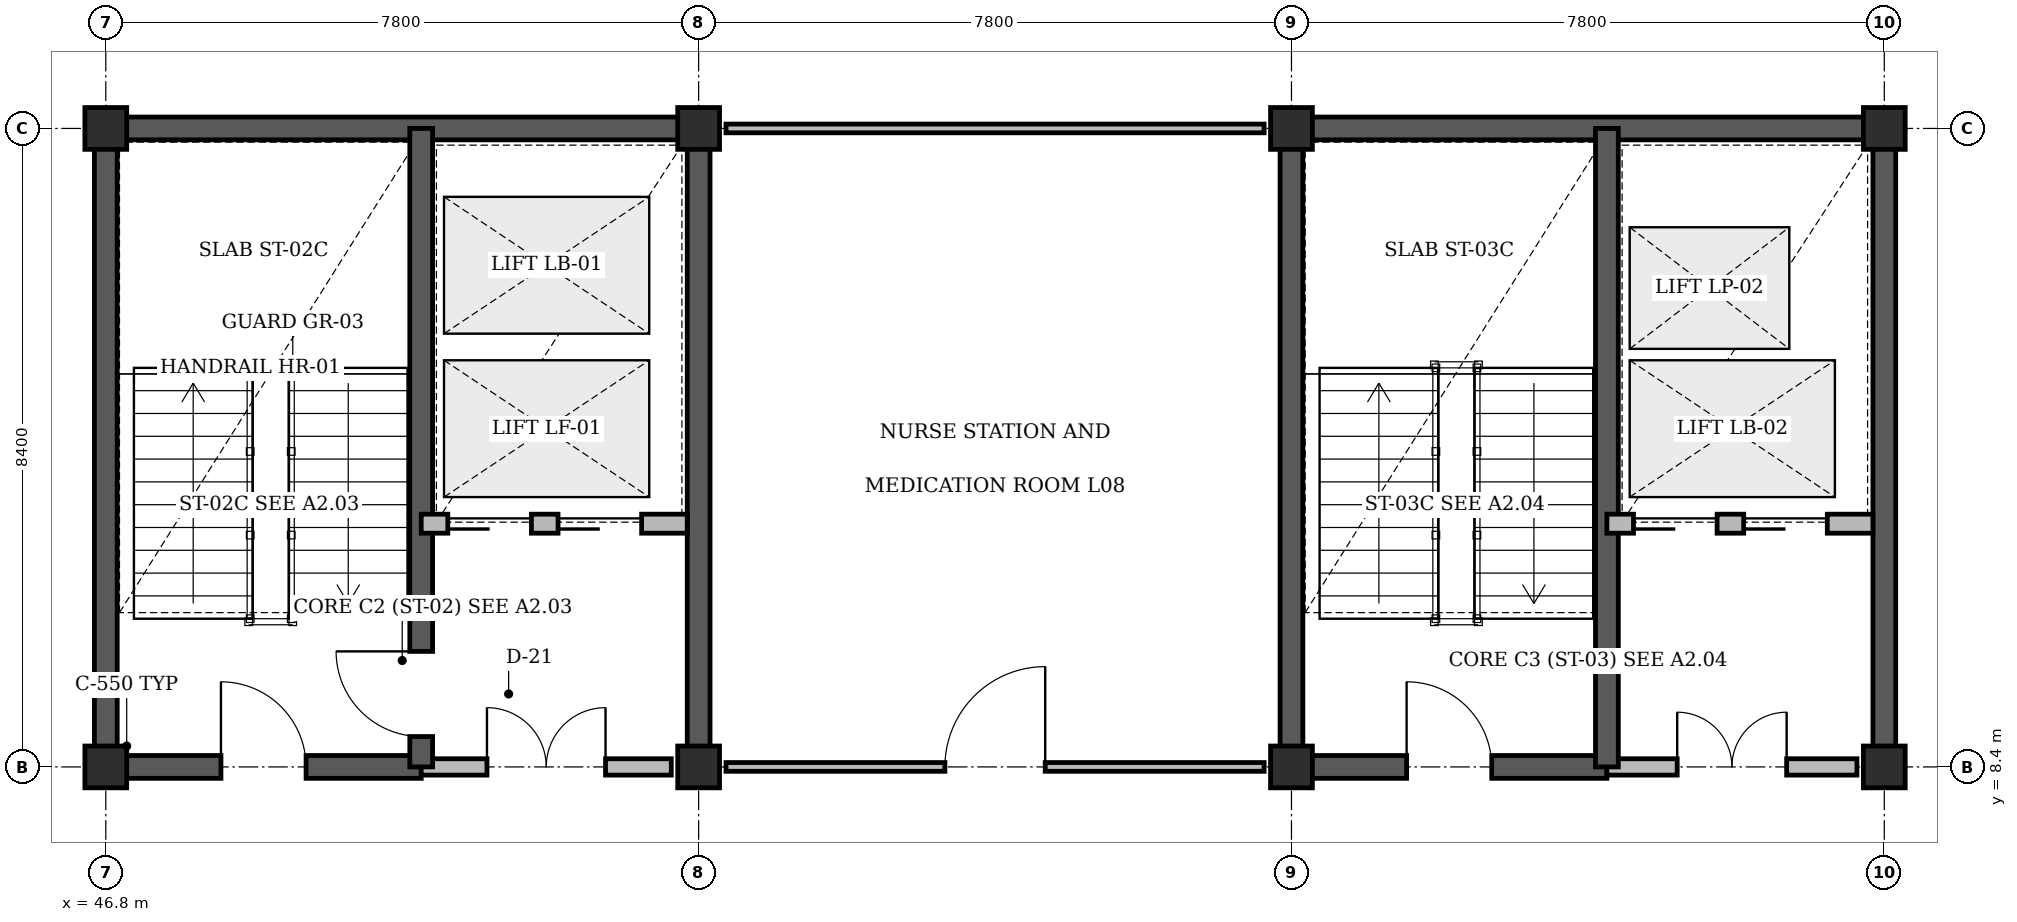
"""IFC4 building model, lengths in metres.
Left out: names, types, materials, properties, quantities, classifications, styles, units other than length and angle.
Written with IfcOpenShell. Run it as: python <this file> out.ifc"""

import sys

from ifc_helpers import new_model, si_unit, direction, frame, frame_2d, origin, origin_2d, place, context, subcontext, project, spatial, rectangle, extrude, element, fill, save


model = new_model("IFC4")
c1 = context("Model", 3, precision=1e-05, world=origin(), true_north=direction((0.0, 1.0)))
c2 = subcontext(c1, "Body", "Model", "MODEL_VIEW")
j1 = project(units=[si_unit("LENGTHUNIT", "METRE"), si_unit("PLANEANGLEUNIT", "RADIAN")], contexts=[c1])
p1 = place(None, origin())
s1 = spatial("IfcSite", under=j1, at=p1, CompositionType="ELEMENT")
p2 = place(p1, origin())
s2 = spatial("IfcBuilding", under=s1, at=p2, CompositionType="ELEMENT")
p3 = place(p2, frame((0.0, 0.0, 34.8)))
s3 = spatial("IfcBuildingStorey", under=s2, at=p3, CompositionType="ELEMENT", Elevation=34.8)
p4 = place(p3, frame((46.65, 16.8, 0.0), z_axis=(0.0, 0.0, 1.0), x_axis=(1.0, 0.0, 0.0)))
e1 = element("IfcWall", 1, at=p4, inside=s3, PredefinedType="SHEAR", context=c2, shape_type="SweptSolid", body=[
    extrude(rectangle(XDim=8.1, YDim=0.3, at=frame_2d((4.05, 0.0))), origin(), (0.0, 0.0, 1.0), 3.92),
])
for number, where, z_axis, x_axis in (
    (2, (46.8, 8.4, 0.0), (0.0, 0.0, 1.0), (0.0, 1.0, 0.0)),
    (3, (54.6, 8.4, 0.0), (0.0, 0.0, 1.0), (0.0, 1.0, 0.0)),
):
    element("IfcWall", number, at=place(p3, frame(where, z_axis=z_axis, x_axis=x_axis)), inside=s3, PredefinedType="SHEAR", context=c2, shape_type="SweptSolid", body=[
        extrude(rectangle(XDim=8.4, YDim=0.3, at=frame_2d((4.2, 0.0))), origin(), (0.0, 0.0, 1.0), 3.92),
    ])
p5 = place(p3, frame((62.25, 16.8, 0.0), z_axis=(0.0, 0.0, 1.0), x_axis=(1.0, 0.0, 0.0)))
e4 = element("IfcWall", 4, at=p5, inside=s3, PredefinedType="SHEAR", context=c2, shape_type="SweptSolid", body=[
    extrude(rectangle(XDim=8.1, YDim=0.3, at=frame_2d((4.05, 0.0))), origin(), (0.0, 0.0, 1.0), 3.92),
])
for number, where, z_axis, x_axis in (
    (5, (62.4, 8.4, 0.0), (0.0, 0.0, 1.0), (0.0, 1.0, 0.0)),
    (6, (70.2, 8.4, 0.0), (0.0, 0.0, 1.0), (0.0, 1.0, 0.0)),
):
    element("IfcWall", number, at=place(p3, frame(where, z_axis=z_axis, x_axis=x_axis)), inside=s3, PredefinedType="SHEAR", context=c2, shape_type="SweptSolid", body=[
        extrude(rectangle(XDim=8.4, YDim=0.3, at=frame_2d((4.2, 0.0))), origin(), (0.0, 0.0, 1.0), 3.92),
    ])
for number, where, z_axis, x_axis in (
    (7, (46.8, 8.4, 0.0), (0.0, 0.0, 1.0), (1.0, 0.0, 0.0)),
    (8, (46.8, 16.8, 0.0), (0.0, 0.0, 1.0), (1.0, 0.0, 0.0)),
    (9, (54.6, 8.4, 0.0), (0.0, 0.0, 1.0), (1.0, 0.0, 0.0)),
    (10, (54.6, 16.8, 0.0), (0.0, 0.0, 1.0), (1.0, 0.0, 0.0)),
    (11, (62.4, 8.4, 0.0), (0.0, 0.0, 1.0), (1.0, 0.0, 0.0)),
    (12, (62.4, 16.8, 0.0), (0.0, 0.0, 1.0), (1.0, 0.0, 0.0)),
    (13, (70.2, 8.4, 0.0), (0.0, 0.0, 1.0), (1.0, 0.0, 0.0)),
    (14, (70.2, 16.8, 0.0), (0.0, 0.0, 1.0), (1.0, 0.0, 0.0)),
):
    element("IfcColumn", number, at=place(p3, frame(where, z_axis=z_axis, x_axis=x_axis)), inside=s3, PredefinedType="COLUMN", context=c2, shape_type="SweptSolid", body=[
        extrude(rectangle(XDim=0.55, YDim=0.55, at=origin_2d()), origin(), (0.0, 0.0, 1.0), 4.2),
    ])
p6 = place(p3, frame((46.8, 8.4, 0.0), z_axis=(0.0, 0.0, 1.0), x_axis=(1.0, 0.0, 0.0)))
e15 = element("IfcWall", 15, at=p6, inside=s3, PredefinedType="SHEAR", context=c2, shape_type="SweptSolid", body=[
    extrude(rectangle(XDim=4.15, YDim=0.3, at=frame_2d((2.075, 0.0))), origin(), (0.0, 0.0, 1.0), 4.2),
])
p7 = place(p6, frame((1.515, 0.0, 0.0)))
e16 = element("IfcOpeningElement", 16, at=p7, cuts=e15, PredefinedType="OPENING", context=c2, shape_type="SweptSolid", body=[
    extrude(rectangle(XDim=1.12, YDim=2.15, at=frame_2d((0.56, 1.075))), frame((0.0, 0.16, 0.0), z_axis=(0.0, -1.0, 0.0), x_axis=(1.0, 0.0, 0.0)), (0.0, 0.0, 1.0), 0.32),
])
p8 = place(p3, frame((50.95, 8.4, 0.0), z_axis=(0.0, 0.0, 1.0), x_axis=(1.0, 0.0, 0.0)))
e17 = element("IfcWall", 17, at=p8, inside=s3, PredefinedType="STANDARD", context=c2, shape_type="SweptSolid", body=[
    extrude(rectangle(XDim=3.29, YDim=0.215, at=frame_2d((1.645, 0.0))), origin(), (0.0, 0.0, 1.0), 3.32),
])
p9 = place(p8, frame((0.865, 0.0, 0.0)))
e18 = element("IfcOpeningElement", 18, at=p9, cuts=e17, PredefinedType="OPENING", context=c2, shape_type="SweptSolid", body=[
    extrude(rectangle(XDim=1.56, YDim=2.2, at=frame_2d((0.78, 1.1))), frame((0.0, 0.118, 0.0), z_axis=(0.0, -1.0, 0.0), x_axis=(1.0, 0.0, 0.0)), (0.0, 0.0, 1.0), 0.235),
])
p10 = place(p3, frame((50.95, 8.4, 0.0), z_axis=(0.0, 0.0, 1.0), x_axis=(0.0, 1.0, 0.0)))
e19 = element("IfcWall", 19, at=p10, inside=s3, PredefinedType="SHEAR", context=c2, shape_type="SweptSolid", body=[
    extrude(rectangle(XDim=8.4, YDim=0.3, at=frame_2d((4.2, 0.0))), origin(), (0.0, 0.0, 1.0), 4.2),
])
p11 = place(p10, frame((0.4, 0.0, 0.0)))
e20 = element("IfcOpeningElement", 20, at=p11, cuts=e19, PredefinedType="OPENING", context=c2, shape_type="SweptSolid", body=[
    extrude(rectangle(XDim=1.12, YDim=2.15, at=frame_2d((0.56, 1.075))), frame((0.0, 0.16, 0.0), z_axis=(0.0, -1.0, 0.0), x_axis=(1.0, 0.0, 0.0)), (0.0, 0.0, 1.0), 0.32),
])
p12 = place(p3, frame((50.95, 11.6, 0.0), z_axis=(0.0, 0.0, 1.0), x_axis=(1.0, 0.0, 0.0)))
e21 = element("IfcWall", 21, at=p12, inside=s3, PredefinedType="STANDARD", context=c2, shape_type="SweptSolid", body=[
    extrude(rectangle(XDim=3.5, YDim=0.25, at=frame_2d((1.75, 0.0))), origin(), (0.0, 0.0, 1.0), 3.9),
])
p13 = place(p12, frame((0.35, 0.0, 0.0)))
e22 = element("IfcOpeningElement", 22, at=p13, cuts=e21, PredefinedType="OPENING", context=c2, shape_type="SweptSolid", body=[
    extrude(rectangle(XDim=1.1, YDim=2.2, at=frame_2d((0.55, 1.1))), frame((0.0, 0.135, 0.0), z_axis=(0.0, -1.0, 0.0), x_axis=(1.0, 0.0, 0.0)), (0.0, 0.0, 1.0), 0.27),
])
p14 = place(p12, frame((1.8, 0.0, 0.0)))
e23 = element("IfcOpeningElement", 23, at=p14, cuts=e21, PredefinedType="OPENING", context=c2, shape_type="SweptSolid", body=[
    extrude(rectangle(XDim=1.1, YDim=2.2, at=frame_2d((0.55, 1.1))), frame((0.0, 0.135, 0.0), z_axis=(0.0, -1.0, 0.0), x_axis=(1.0, 0.0, 0.0)), (0.0, 0.0, 1.0), 0.27),
])
p15 = place(p3, frame((62.4, 8.4, 0.0), z_axis=(0.0, 0.0, 1.0), x_axis=(1.0, 0.0, 0.0)))
e24 = element("IfcWall", 24, at=p15, inside=s3, PredefinedType="SHEAR", context=c2, shape_type="SweptSolid", body=[
    extrude(rectangle(XDim=4.15, YDim=0.3, at=frame_2d((2.075, 0.0))), origin(), (0.0, 0.0, 1.0), 4.2),
])
p16 = place(p15, frame((1.515, 0.0, 0.0)))
e25 = element("IfcOpeningElement", 25, at=p16, cuts=e24, PredefinedType="OPENING", context=c2, shape_type="SweptSolid", body=[
    extrude(rectangle(XDim=1.12, YDim=2.15, at=frame_2d((0.56, 1.075))), frame((0.0, 0.16, 0.0), z_axis=(0.0, -1.0, 0.0), x_axis=(1.0, 0.0, 0.0)), (0.0, 0.0, 1.0), 0.32),
])
p17 = place(p3, frame((66.55, 8.4, 0.0), z_axis=(0.0, 0.0, 1.0), x_axis=(1.0, 0.0, 0.0)))
e26 = element("IfcWall", 26, at=p17, inside=s3, PredefinedType="STANDARD", context=c2, shape_type="SweptSolid", body=[
    extrude(rectangle(XDim=3.29, YDim=0.215, at=frame_2d((1.645, 0.0))), origin(), (0.0, 0.0, 1.0), 3.32),
])
p18 = place(p17, frame((0.925, 0.0, 0.0)))
e27 = element("IfcOpeningElement", 27, at=p18, cuts=e26, PredefinedType="OPENING", context=c2, shape_type="SweptSolid", body=[
    extrude(rectangle(XDim=1.44, YDim=2.2, at=frame_2d((0.72, 1.1))), frame((0.0, 0.118, 0.0), z_axis=(0.0, -1.0, 0.0), x_axis=(1.0, 0.0, 0.0)), (0.0, 0.0, 1.0), 0.235),
])
p19 = place(p3, frame((66.55, 8.4, 0.0), z_axis=(0.0, 0.0, 1.0), x_axis=(0.0, 1.0, 0.0)))
e28 = element("IfcWall", 28, at=p19, inside=s3, PredefinedType="SHEAR", context=c2, shape_type="SweptSolid", body=[
    extrude(rectangle(XDim=8.4, YDim=0.3, at=frame_2d((4.2, 0.0))), origin(), (0.0, 0.0, 1.0), 4.2),
])
p20 = place(p3, frame((66.55, 11.6, 0.0), z_axis=(0.0, 0.0, 1.0), x_axis=(1.0, 0.0, 0.0)))
e29 = element("IfcWall", 29, at=p20, inside=s3, PredefinedType="STANDARD", context=c2, shape_type="SweptSolid", body=[
    extrude(rectangle(XDim=3.5, YDim=0.25, at=frame_2d((1.75, 0.0))), origin(), (0.0, 0.0, 1.0), 3.9),
])
p21 = place(p20, frame((0.35, 0.0, 0.0)))
e30 = element("IfcOpeningElement", 30, at=p21, cuts=e29, PredefinedType="OPENING", context=c2, shape_type="SweptSolid", body=[
    extrude(rectangle(XDim=1.1, YDim=2.2, at=frame_2d((0.55, 1.1))), frame((0.0, 0.135, 0.0), z_axis=(0.0, -1.0, 0.0), x_axis=(1.0, 0.0, 0.0)), (0.0, 0.0, 1.0), 0.27),
])
p22 = place(p20, frame((1.8, 0.0, 0.0)))
e31 = element("IfcOpeningElement", 31, at=p22, cuts=e29, PredefinedType="OPENING", context=c2, shape_type="SweptSolid", body=[
    extrude(rectangle(XDim=1.1, YDim=2.2, at=frame_2d((0.55, 1.1))), frame((0.0, 0.135, 0.0), z_axis=(0.0, -1.0, 0.0), x_axis=(1.0, 0.0, 0.0)), (0.0, 0.0, 1.0), 0.27),
])
p23 = place(p3, frame((54.96, 8.4, 0.0), z_axis=(0.0, 0.0, 1.0), x_axis=(1.0, 0.0, 0.0)))
e32 = element("IfcWall", 32, at=p23, inside=s3, PredefinedType="PARTITIONING", context=c2, shape_type="SweptSolid", body=[
    extrude(rectangle(XDim=7.08, YDim=0.115, at=frame_2d((3.54, 0.0))), origin(), (0.0, 0.0, 1.0), 3.32),
])
p24 = place(p23, frame((2.88, 0.0, 0.0)))
e33 = element("IfcOpeningElement", 33, at=p24, cuts=e32, PredefinedType="OPENING", context=c2, shape_type="SweptSolid", body=[
    extrude(rectangle(XDim=1.32, YDim=2.15, at=frame_2d((0.66, 1.075))), frame((0.0, 0.067, 0.0), z_axis=(0.0, -1.0, 0.0), x_axis=(1.0, 0.0, 0.0)), (0.0, 0.0, 1.0), 0.135),
])
p25 = place(p3, frame((54.96, 16.8, 0.0), z_axis=(0.0, 0.0, 1.0), x_axis=(1.0, 0.0, 0.0)))
e34 = element("IfcWall", 34, at=p25, inside=s3, PredefinedType="PARTITIONING", context=c2, shape_type="SweptSolid", body=[
    extrude(rectangle(XDim=7.08, YDim=0.115, at=frame_2d((3.54, 0.0))), origin(), (0.0, 0.0, 1.0), 3.32),
])
p26 = place(p7, origin())
e35 = element("IfcDoor", 35, at=p26, inside=s3, OperationType="SINGLE_SWING_LEFT", PredefinedType="DOOR", context=c2, shape_type="SweptSolid", body=[
    extrude(rectangle(XDim=1.12, YDim=2.15, at=frame_2d((0.56, 1.075))), frame((0.0, 0.025, 0.0), z_axis=(0.0, -1.0, 0.0), x_axis=(1.0, 0.0, 0.0)), (0.0, 0.0, 1.0), 0.05),
])
fill(e16, e35)
p27 = place(p9, origin())
e36 = element("IfcDoor", 36, at=p27, inside=s3, OperationType="DOUBLE_DOOR_SINGLE_SWING", PredefinedType="DOOR", context=c2, shape_type="SweptSolid", body=[
    extrude(rectangle(XDim=1.56, YDim=2.2, at=frame_2d((0.78, 1.1))), frame((0.0, 0.025, 0.0), z_axis=(0.0, -1.0, 0.0), x_axis=(1.0, 0.0, 0.0)), (0.0, 0.0, 1.0), 0.05),
])
fill(e18, e36)
p28 = place(p11, origin())
e37 = element("IfcDoor", 37, at=p28, inside=s3, OperationType="SINGLE_SWING_RIGHT", PredefinedType="DOOR", context=c2, shape_type="SweptSolid", body=[
    extrude(rectangle(XDim=1.12, YDim=2.15, at=frame_2d((0.56, 1.075))), frame((0.0, 0.025, 0.0), z_axis=(0.0, -1.0, 0.0), x_axis=(1.0, 0.0, 0.0)), (0.0, 0.0, 1.0), 0.05),
])
fill(e20, e37)
p29 = place(p13, origin())
e38 = element("IfcDoor", 38, at=p29, inside=s3, OperationType="SLIDING_TO_LEFT", PredefinedType="DOOR", context=c2, shape_type="SweptSolid", body=[
    extrude(rectangle(XDim=1.1, YDim=2.2, at=frame_2d((0.55, 1.1))), frame((0.0, 0.025, 0.0), z_axis=(0.0, -1.0, 0.0), x_axis=(1.0, 0.0, 0.0)), (0.0, 0.0, 1.0), 0.05),
])
fill(e22, e38)
p30 = place(p14, origin())
e39 = element("IfcDoor", 39, at=p30, inside=s3, OperationType="SLIDING_TO_LEFT", PredefinedType="DOOR", context=c2, shape_type="SweptSolid", body=[
    extrude(rectangle(XDim=1.1, YDim=2.2, at=frame_2d((0.55, 1.1))), frame((0.0, 0.025, 0.0), z_axis=(0.0, -1.0, 0.0), x_axis=(1.0, 0.0, 0.0)), (0.0, 0.0, 1.0), 0.05),
])
fill(e23, e39)
p31 = place(p16, origin())
e40 = element("IfcDoor", 40, at=p31, inside=s3, OperationType="SINGLE_SWING_LEFT", PredefinedType="DOOR", context=c2, shape_type="SweptSolid", body=[
    extrude(rectangle(XDim=1.12, YDim=2.15, at=frame_2d((0.56, 1.075))), frame((0.0, 0.025, 0.0), z_axis=(0.0, -1.0, 0.0), x_axis=(1.0, 0.0, 0.0)), (0.0, 0.0, 1.0), 0.05),
])
fill(e25, e40)
p32 = place(p18, origin())
e41 = element("IfcDoor", 41, at=p32, inside=s3, OperationType="DOUBLE_DOOR_SINGLE_SWING", PredefinedType="DOOR", context=c2, shape_type="SweptSolid", body=[
    extrude(rectangle(XDim=1.44, YDim=2.2, at=frame_2d((0.72, 1.1))), frame((0.0, 0.025, 0.0), z_axis=(0.0, -1.0, 0.0), x_axis=(1.0, 0.0, 0.0)), (0.0, 0.0, 1.0), 0.05),
])
fill(e27, e41)
p33 = place(p21, origin())
e42 = element("IfcDoor", 42, at=p33, inside=s3, OperationType="SLIDING_TO_LEFT", PredefinedType="DOOR", context=c2, shape_type="SweptSolid", body=[
    extrude(rectangle(XDim=1.1, YDim=2.2, at=frame_2d((0.55, 1.1))), frame((0.0, 0.025, 0.0), z_axis=(0.0, -1.0, 0.0), x_axis=(1.0, 0.0, 0.0)), (0.0, 0.0, 1.0), 0.05),
])
fill(e30, e42)
p34 = place(p22, origin())
e43 = element("IfcDoor", 43, at=p34, inside=s3, OperationType="SLIDING_TO_LEFT", PredefinedType="DOOR", context=c2, shape_type="SweptSolid", body=[
    extrude(rectangle(XDim=1.1, YDim=2.2, at=frame_2d((0.55, 1.1))), frame((0.0, 0.025, 0.0), z_axis=(0.0, -1.0, 0.0), x_axis=(1.0, 0.0, 0.0)), (0.0, 0.0, 1.0), 0.05),
])
fill(e31, e43)
p35 = place(p24, origin())
e44 = element("IfcDoor", 44, at=p35, inside=s3, OperationType="SINGLE_SWING_RIGHT", PredefinedType="DOOR", context=c2, shape_type="SweptSolid", body=[
    extrude(rectangle(XDim=1.32, YDim=2.15, at=frame_2d((0.66, 1.075))), frame((0.0, 0.025, 0.0), z_axis=(0.0, -1.0, 0.0), x_axis=(1.0, 0.0, 0.0)), (0.0, 0.0, 1.0), 0.05),
])
fill(e33, e44)
save(model, sys.argv[1])
